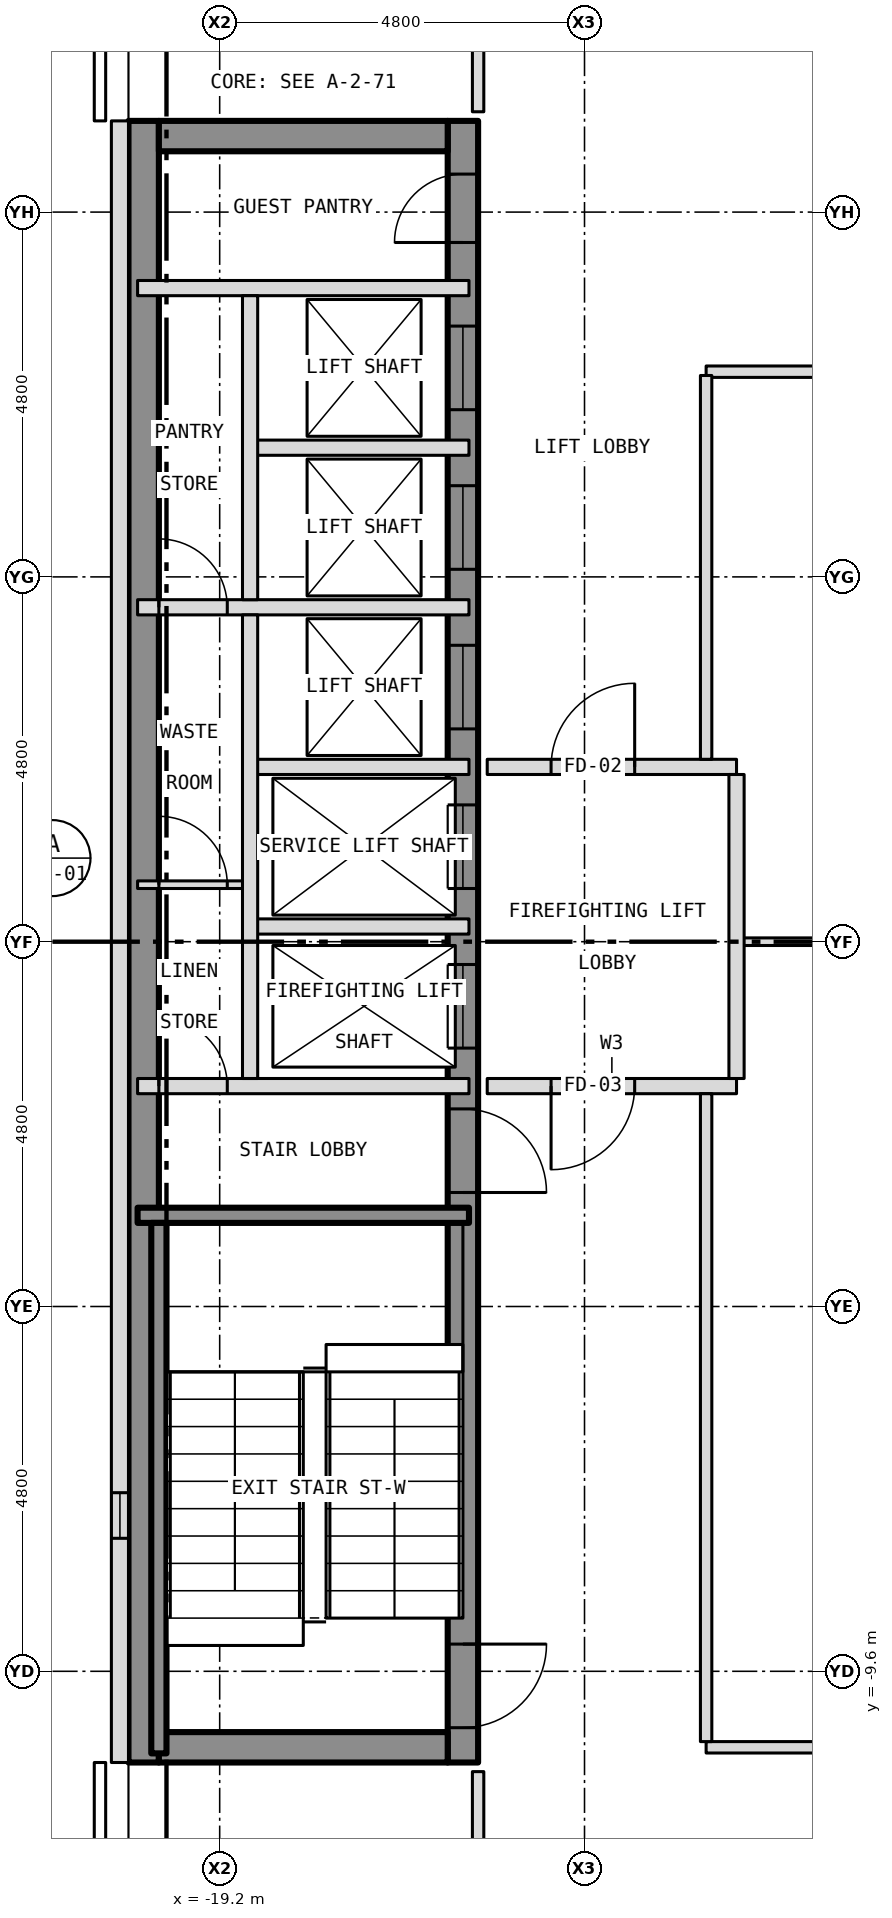
"""IFC4 building model, lengths in metres.
Left out: names, types, materials, properties, quantities, classifications, styles, units other than length and angle.
Written with IfcOpenShell. Run it as: python <this file> out.ifc"""

import sys

from ifc_helpers import new_model, si_unit, direction, frame, frame_2d, origin, place, context, subcontext, project, spatial, rectangle, extrude, element, fill, save


model = new_model("IFC4")
c1 = context("Model", 3, precision=1e-05, world=origin(), true_north=direction((0.0, 1.0)))
c2 = subcontext(c1, "Body", "Model", "MODEL_VIEW")
j1 = project(units=[si_unit("LENGTHUNIT", "METRE"), si_unit("PLANEANGLEUNIT", "RADIAN")], contexts=[c1])
p1 = place(None, origin())
s1 = spatial("IfcSite", under=j1, at=p1, CompositionType="ELEMENT")
p2 = place(p1, origin())
s2 = spatial("IfcBuilding", under=s1, at=p2, CompositionType="ELEMENT")
p3 = place(p2, frame((0.0, 0.0, 258.5)))
s3 = spatial("IfcBuildingStorey", under=s2, at=p3, CompositionType="ELEMENT", Elevation=258.5)
p4 = place(p3, frame((-16.0, -10.8, 0.0), z_axis=(0.0, 0.0, 1.0), x_axis=(0.0, 1.0, 0.0)))
e1 = element("IfcWall", 1, at=p4, inside=s3, PredefinedType="SHEAR", context=c2, shape_type="SweptSolid", body=[
    extrude(rectangle(XDim=21.6, YDim=0.4, at=frame_2d((10.8, 0.0))), origin(), (0.0, 0.0, 1.0), 3.25),
])
p5 = place(p4, frame((9.4, 0.0, 0.0)))
e2 = element("IfcOpeningElement", 2, at=p5, cuts=e1, PredefinedType="OPENING", context=c2, shape_type="SweptSolid", body=[
    extrude(rectangle(XDim=1.1, YDim=2.1, at=frame_2d((0.55, 1.05))), frame((0.0, 0.212, 0.0), z_axis=(0.0, -1.0, 0.0), x_axis=(1.0, 0.0, 0.0)), (0.0, 0.0, 1.0), 0.424),
])
p6 = place(p4, frame((11.5, 0.0, 0.0)))
e3 = element("IfcOpeningElement", 3, at=p6, cuts=e1, PredefinedType="OPENING", context=c2, shape_type="SweptSolid", body=[
    extrude(rectangle(XDim=1.1, YDim=2.1, at=frame_2d((0.55, 1.05))), frame((0.0, 0.212, 0.0), z_axis=(0.0, -1.0, 0.0), x_axis=(1.0, 0.0, 0.0)), (0.0, 0.0, 1.0), 0.424),
])
p7 = place(p4, frame((13.6, 0.0, 0.0)))
e4 = element("IfcOpeningElement", 4, at=p7, cuts=e1, PredefinedType="OPENING", context=c2, shape_type="SweptSolid", body=[
    extrude(rectangle(XDim=1.1, YDim=2.1, at=frame_2d((0.55, 1.05))), frame((0.0, 0.212, 0.0), z_axis=(0.0, -1.0, 0.0), x_axis=(1.0, 0.0, 0.0)), (0.0, 0.0, 1.0), 0.424),
])
p8 = place(p4, frame((15.7, 0.0, 0.0)))
e5 = element("IfcOpeningElement", 5, at=p8, cuts=e1, PredefinedType="OPENING", context=c2, shape_type="SweptSolid", body=[
    extrude(rectangle(XDim=1.1, YDim=2.1, at=frame_2d((0.55, 1.05))), frame((0.0, 0.212, 0.0), z_axis=(0.0, -1.0, 0.0), x_axis=(1.0, 0.0, 0.0)), (0.0, 0.0, 1.0), 0.424),
])
p9 = place(p4, frame((17.8, 0.0, 0.0)))
e6 = element("IfcOpeningElement", 6, at=p9, cuts=e1, PredefinedType="OPENING", context=c2, shape_type="SweptSolid", body=[
    extrude(rectangle(XDim=1.1, YDim=2.1, at=frame_2d((0.55, 1.05))), frame((0.0, 0.212, 0.0), z_axis=(0.0, -1.0, 0.0), x_axis=(1.0, 0.0, 0.0)), (0.0, 0.0, 1.0), 0.424),
])
p10 = place(p4, frame((0.458, 0.0, 0.0)))
e7 = element("IfcOpeningElement", 7, at=p10, cuts=e1, PredefinedType="OPENING", context=c2, shape_type="SweptSolid", body=[
    extrude(rectangle(XDim=1.1, YDim=2.1, at=frame_2d((0.55, 1.05))), frame((0.0, 0.212, 0.0), z_axis=(0.0, -1.0, 0.0), x_axis=(1.0, 0.0, 0.0)), (0.0, 0.0, 1.0), 0.424),
])
p11 = place(p4, frame((7.5, 0.0, 0.0)))
e8 = element("IfcOpeningElement", 8, at=p11, cuts=e1, PredefinedType="OPENING", context=c2, shape_type="SweptSolid", body=[
    extrude(rectangle(XDim=1.1, YDim=2.1, at=frame_2d((0.55, 1.05))), frame((0.0, 0.212, 0.0), z_axis=(0.0, -1.0, 0.0), x_axis=(1.0, 0.0, 0.0)), (0.0, 0.0, 1.0), 0.424),
])
p12 = place(p4, frame((20.0, 0.0, 0.0)))
e9 = element("IfcOpeningElement", 9, at=p12, cuts=e1, PredefinedType="OPENING", context=c2, shape_type="SweptSolid", body=[
    extrude(rectangle(XDim=0.9, YDim=2.1, at=frame_2d((0.45, 1.05))), frame((0.0, 0.212, 0.0), z_axis=(0.0, -1.0, 0.0), x_axis=(1.0, 0.0, 0.0)), (0.0, 0.0, 1.0), 0.424),
])
p13 = place(p3, frame((-20.2, -10.8, 0.0), z_axis=(0.0, 0.0, 1.0), x_axis=(0.0, 1.0, 0.0)))
e10 = element("IfcWall", 10, at=p13, inside=s3, PredefinedType="SHEAR", context=c2, shape_type="SweptSolid", body=[
    extrude(rectangle(XDim=21.6, YDim=0.4, at=frame_2d((10.8, 0.0))), origin(), (0.0, 0.0, 1.0), 3.25),
])
for number, where, z_axis, x_axis in (
    (11, (-20.0, 10.6, 0.0), (0.0, 0.0, 1.0), (1.0, 0.0, 0.0)),
    (12, (-20.0, -10.6, 0.0), (0.0, 0.0, 1.0), (1.0, 0.0, 0.0)),
):
    element("IfcWall", number, at=place(p3, frame(where, z_axis=z_axis, x_axis=x_axis)), inside=s3, PredefinedType="SHEAR", context=c2, shape_type="SweptSolid", body=[
        extrude(rectangle(XDim=3.8, YDim=0.4, at=frame_2d((1.9, 0.0))), origin(), (0.0, 0.0, 1.0), 3.25),
    ])
p14 = place(p3, frame((-20.512, 10.8, 0.0), z_axis=(0.0, 0.0, 1.0), x_axis=(0.0, -1.0, 0.0)))
e13 = element("IfcWall", 13, at=p14, inside=s3, PredefinedType="SOLIDWALL", context=c2, shape_type="SweptSolid", body=[
    extrude(rectangle(XDim=21.6, YDim=0.225, at=frame_2d((10.8, 0.0))), origin(), (0.0, 0.0, 1.0), 3.5),
])
p15 = place(p14, frame((18.05, 0.0, 1.0)))
e14 = element("IfcOpeningElement", 14, at=p15, cuts=e13, PredefinedType="OPENING", context=c2, shape_type="SweptSolid", body=[
    extrude(rectangle(XDim=0.6, YDim=1.5, at=frame_2d((0.3, 0.75))), frame((0.0, 0.125, 0.0), z_axis=(0.0, -1.0, 0.0), x_axis=(1.0, 0.0, 0.0)), (0.0, 0.0, 1.0), 0.249),
])
p16 = place(p3, frame((-12.8, -10.6, 0.0), z_axis=(0.0, 0.0, 1.0), x_axis=(1.0, 0.0, 0.0)))
e15 = element("IfcWall", 15, at=p16, inside=s3, PredefinedType="PARTITIONING", context=c2, shape_type="SweptSolid", body=[
    extrude(rectangle(XDim=18.7, YDim=0.15, at=frame_2d((9.35, 0.0))), origin(), (0.0, 0.0, 1.0), 3.35),
])
p17 = place(p16, frame((8.9, 0.0, 0.0)))
e16 = element("IfcOpeningElement", 16, at=p17, cuts=e15, PredefinedType="OPENING", context=c2, shape_type="SweptSolid", body=[
    extrude(rectangle(XDim=0.9, YDim=2.1, at=frame_2d((0.45, 1.05))), frame((0.0, 0.087, 0.0), z_axis=(0.0, -1.0, 0.0), x_axis=(1.0, 0.0, 0.0)), (0.0, 0.0, 1.0), 0.174),
])
p18 = place(p3, frame((-20.28, -3.6, 0.0), z_axis=(0.0, 0.0, 1.0), x_axis=(1.0, 0.0, 0.0)))
e17 = element("IfcWall", 17, at=p18, inside=s3, PredefinedType="SHEAR", context=c2, shape_type="SweptSolid", body=[
    extrude(rectangle(XDim=4.36, YDim=0.2, at=frame_2d((2.18, 0.0))), origin(), (0.0, 0.0, 1.0), 3.25),
])
p19 = place(p3, frame((-20.28, -1.9, 0.0), z_axis=(0.0, 0.0, 1.0), x_axis=(1.0, 0.0, 0.0)))
e18 = element("IfcWall", 18, at=p19, inside=s3, PredefinedType="PARTITIONING", context=c2, shape_type="SweptSolid", body=[
    extrude(rectangle(XDim=4.36, YDim=0.2, at=frame_2d((2.18, 0.0))), origin(), (0.0, 0.0, 1.0), 3.25),
])
p20 = place(p19, frame((0.28, 0.0, 0.0)))
e19 = element("IfcOpeningElement", 19, at=p20, cuts=e18, PredefinedType="OPENING", context=c2, shape_type="SweptSolid", body=[
    extrude(rectangle(XDim=0.9, YDim=2.1, at=frame_2d((0.45, 1.05))), frame((0.0, 0.112, 0.0), z_axis=(0.0, -1.0, 0.0), x_axis=(1.0, 0.0, 0.0)), (0.0, 0.0, 1.0), 0.224),
])
p21 = place(p3, frame((-15.68, -1.9, 0.0), z_axis=(0.0, 0.0, 1.0), x_axis=(1.0, 0.0, 0.0)))
e20 = element("IfcWall", 20, at=p21, inside=s3, PredefinedType="PARTITIONING", context=c2, shape_type="SweptSolid", body=[
    extrude(rectangle(XDim=3.28, YDim=0.2, at=frame_2d((1.64, 0.0))), origin(), (0.0, 0.0, 1.0), 3.35),
])
p22 = place(p21, frame((0.84, 0.0, 0.0)))
e21 = element("IfcOpeningElement", 21, at=p22, cuts=e20, PredefinedType="OPENING", context=c2, shape_type="SweptSolid", body=[
    extrude(rectangle(XDim=1.1, YDim=2.1, at=frame_2d((0.55, 1.05))), frame((0.0, 0.112, 0.0), z_axis=(0.0, -1.0, 0.0), x_axis=(1.0, 0.0, 0.0)), (0.0, 0.0, 1.0), 0.224),
])
p23 = place(p3, frame((-12.4, 0.0, 0.0), z_axis=(0.0, 0.0, 1.0), x_axis=(1.0, 0.0, 0.0)))
e22 = element("IfcWall", 22, at=p23, inside=s3, PredefinedType="PARTITIONING", context=c2, shape_type="SweptSolid", body=[
    extrude(rectangle(XDim=2.616, YDim=0.1, at=frame_2d((1.308, 0.0))), origin(), (0.0, 0.0, 1.0), 2.728),
])
p24 = place(p3, frame((-18.8, 0.2, 0.0), z_axis=(0.0, 0.0, 1.0), x_axis=(1.0, 0.0, 0.0)))
e23 = element("IfcWall", 23, at=p24, inside=s3, PredefinedType="PARTITIONING", context=c2, shape_type="SweptSolid", body=[
    extrude(rectangle(XDim=2.88, YDim=0.2, at=frame_2d((1.44, 0.0))), origin(), (0.0, 0.0, 1.0), 3.25),
])
p25 = place(p3, frame((-20.28, 0.75, 0.0), z_axis=(0.0, 0.0, 1.0), x_axis=(1.0, 0.0, 0.0)))
e24 = element("IfcWall", 24, at=p25, inside=s3, PredefinedType="PARTITIONING", context=c2, shape_type="SweptSolid", body=[
    extrude(rectangle(XDim=1.48, YDim=0.1, at=frame_2d((0.74, 0.0))), origin(), (0.0, 0.0, 1.0), 3.25),
])
p26 = place(p25, frame((0.28, 0.0, 0.0)))
e25 = element("IfcOpeningElement", 25, at=p26, cuts=e24, PredefinedType="OPENING", context=c2, shape_type="SweptSolid", body=[
    extrude(rectangle(XDim=0.9, YDim=2.1, at=frame_2d((0.45, 1.05))), frame((0.0, 0.062, 0.0), z_axis=(0.0, -1.0, 0.0), x_axis=(1.0, 0.0, 0.0)), (0.0, 0.0, 1.0), 0.124),
])
p27 = place(p3, frame((-18.8, 2.3, 0.0), z_axis=(0.0, 0.0, 1.0), x_axis=(1.0, 0.0, 0.0)))
e26 = element("IfcWall", 26, at=p27, inside=s3, PredefinedType="PARTITIONING", context=c2, shape_type="SweptSolid", body=[
    extrude(rectangle(XDim=2.88, YDim=0.2, at=frame_2d((1.44, 0.0))), origin(), (0.0, 0.0, 1.0), 3.25),
])
p28 = place(p3, frame((-15.68, 2.3, 0.0), z_axis=(0.0, 0.0, 1.0), x_axis=(1.0, 0.0, 0.0)))
e27 = element("IfcWall", 27, at=p28, inside=s3, PredefinedType="PARTITIONING", context=c2, shape_type="SweptSolid", body=[
    extrude(rectangle(XDim=3.28, YDim=0.2, at=frame_2d((1.64, 0.0))), origin(), (0.0, 0.0, 1.0), 3.35),
])
p29 = place(p28, frame((0.84, 0.0, 0.0)))
e28 = element("IfcOpeningElement", 28, at=p29, cuts=e27, PredefinedType="OPENING", context=c2, shape_type="SweptSolid", body=[
    extrude(rectangle(XDim=1.1, YDim=2.1, at=frame_2d((0.55, 1.05))), frame((0.0, 0.112, 0.0), z_axis=(0.0, -1.0, 0.0), x_axis=(1.0, 0.0, 0.0)), (0.0, 0.0, 1.0), 0.224),
])
p30 = place(p3, frame((-20.28, 4.4, 0.0), z_axis=(0.0, 0.0, 1.0), x_axis=(1.0, 0.0, 0.0)))
e29 = element("IfcWall", 29, at=p30, inside=s3, PredefinedType="PARTITIONING", context=c2, shape_type="SweptSolid", body=[
    extrude(rectangle(XDim=4.36, YDim=0.2, at=frame_2d((2.18, 0.0))), origin(), (0.0, 0.0, 1.0), 3.25),
])
p31 = place(p30, frame((0.28, 0.0, 0.0)))
e30 = element("IfcOpeningElement", 30, at=p31, cuts=e29, PredefinedType="OPENING", context=c2, shape_type="SweptSolid", body=[
    extrude(rectangle(XDim=0.9, YDim=2.1, at=frame_2d((0.45, 1.05))), frame((0.0, 0.112, 0.0), z_axis=(0.0, -1.0, 0.0), x_axis=(1.0, 0.0, 0.0)), (0.0, 0.0, 1.0), 0.224),
])
p32 = place(p3, frame((-18.8, 6.5, 0.0), z_axis=(0.0, 0.0, 1.0), x_axis=(1.0, 0.0, 0.0)))
e31 = element("IfcWall", 31, at=p32, inside=s3, PredefinedType="PARTITIONING", context=c2, shape_type="SweptSolid", body=[
    extrude(rectangle(XDim=2.88, YDim=0.2, at=frame_2d((1.44, 0.0))), origin(), (0.0, 0.0, 1.0), 3.25),
])
p33 = place(p3, frame((-12.8, 7.5, 0.0), z_axis=(0.0, 0.0, 1.0), x_axis=(1.0, 0.0, 0.0)))
e32 = element("IfcWall", 32, at=p33, inside=s3, PredefinedType="PARTITIONING", context=c2, shape_type="SweptSolid", body=[
    extrude(rectangle(XDim=18.7, YDim=0.15, at=frame_2d((9.35, 0.0))), origin(), (0.0, 0.0, 1.0), 3.35),
])
p34 = place(p33, frame((8.9, 0.0, 0.0)))
e33 = element("IfcOpeningElement", 33, at=p34, cuts=e32, PredefinedType="OPENING", context=c2, shape_type="SweptSolid", body=[
    extrude(rectangle(XDim=0.9, YDim=2.1, at=frame_2d((0.45, 1.05))), frame((0.0, 0.087, 0.0), z_axis=(0.0, -1.0, 0.0), x_axis=(1.0, 0.0, 0.0)), (0.0, 0.0, 1.0), 0.174),
])
p35 = place(p3, frame((-20.28, 8.6, 0.0), z_axis=(0.0, 0.0, 1.0), x_axis=(1.0, 0.0, 0.0)))
e34 = element("IfcWall", 34, at=p35, inside=s3, PredefinedType="PARTITIONING", context=c2, shape_type="SweptSolid", body=[
    extrude(rectangle(XDim=4.36, YDim=0.2, at=frame_2d((2.18, 0.0))), origin(), (0.0, 0.0, 1.0), 3.25),
])
p36 = place(p3, frame((-20.0, -10.68, 0.0), z_axis=(0.0, 0.0, 1.0), x_axis=(0.0, 1.0, 0.0)))
e35 = element("IfcWall", 35, at=p36, inside=s3, PredefinedType="SHEAR", context=c2, shape_type="SweptSolid", body=[
    extrude(rectangle(XDim=6.98, YDim=0.2, at=frame_2d((3.49, 0.0))), origin(), (0.0, 0.0, 1.0), 3.25),
])
p37 = place(p3, frame((-18.8, -1.8, 0.0), z_axis=(0.0, 0.0, 1.0), x_axis=(0.0, 1.0, 0.0)))
e36 = element("IfcWall", 36, at=p37, inside=s3, PredefinedType="PARTITIONING", context=c2, shape_type="SweptSolid", body=[
    extrude(rectangle(XDim=6.1, YDim=0.2, at=frame_2d((3.05, 0.0))), origin(), (0.0, 0.0, 1.0), 3.25),
])
p38 = place(p3, frame((-18.8, 4.5, 0.0), z_axis=(0.0, 0.0, 1.0), x_axis=(0.0, 1.0, 0.0)))
e37 = element("IfcWall", 37, at=p38, inside=s3, PredefinedType="PARTITIONING", context=c2, shape_type="SweptSolid", body=[
    extrude(rectangle(XDim=4.0, YDim=0.2, at=frame_2d((2.0, 0.0))), origin(), (0.0, 0.0, 1.0), 3.25),
])
for number, where, z_axis, x_axis in (
    (38, (-15.8, -12.725, 0.0), (0.0, 0.0, 1.0), (0.0, 1.0, 0.0)),
    (39, (-15.8, 10.92, 0.0), (0.0, 0.0, 1.0), (0.0, 1.0, 0.0)),
):
    element("IfcWall", number, at=place(p3, frame(where, z_axis=z_axis, x_axis=x_axis)), inside=s3, PredefinedType="PARTITIONING", context=c2, shape_type="SweptSolid", body=[
        extrude(rectangle(XDim=1.805, YDim=0.15, at=frame_2d((0.903, 0.0))), origin(), (0.0, 0.0, 1.0), 3.35),
    ])
p39 = place(p3, frame((-12.8, -10.525, 0.0), z_axis=(0.0, 0.0, 1.0), x_axis=(0.0, 1.0, 0.0)))
e40 = element("IfcWall", 40, at=p39, inside=s3, PredefinedType="PARTITIONING", context=c2, shape_type="SweptSolid", body=[
    extrude(rectangle(XDim=8.525, YDim=0.15, at=frame_2d((4.262, 0.0))), origin(), (0.0, 0.0, 1.0), 3.35),
])
p40 = place(p3, frame((-12.8, 2.4, 0.0), z_axis=(0.0, 0.0, 1.0), x_axis=(0.0, 1.0, 0.0)))
e41 = element("IfcWall", 41, at=p40, inside=s3, PredefinedType="PARTITIONING", context=c2, shape_type="SweptSolid", body=[
    extrude(rectangle(XDim=5.05, YDim=0.15, at=frame_2d((2.525, 0.0))), origin(), (0.0, 0.0, 1.0), 3.35),
])
p41 = place(p3, frame((-12.4, -1.8, 0.0), z_axis=(0.0, 0.0, 1.0), x_axis=(0.0, 1.0, 0.0)))
e42 = element("IfcWall", 42, at=p41, inside=s3, PredefinedType="PARTITIONING", context=c2, shape_type="SweptSolid", body=[
    extrude(rectangle(XDim=4.0, YDim=0.2, at=frame_2d((2.0, 0.0))), origin(), (0.0, 0.0, 1.0), 3.35),
])
p42 = place(p15, origin())
e43 = element("IfcWindow", 43, at=p42, inside=s3, PartitioningType="SINGLE_PANEL", PredefinedType="WINDOW", context=c2, shape_type="SweptSolid", body=[
    extrude(rectangle(XDim=0.6, YDim=1.5, at=frame_2d((0.3, 0.75))), frame((0.0, -0.022, 0.0), z_axis=(0.0, -1.0, 0.0), x_axis=(1.0, 0.0, 0.0)), (0.0, 0.0, 1.0), 0.06),
])
fill(e14, e43)
p43 = place(p5, origin())
e44 = element("IfcDoor", 44, at=p43, inside=s3, OperationType="SLIDING_TO_LEFT", PredefinedType="DOOR", context=c2, shape_type="SweptSolid", body=[
    extrude(rectangle(XDim=1.1, YDim=2.1, at=frame_2d((0.55, 1.05))), frame((0.0, 0.025, 0.0), z_axis=(0.0, -1.0, 0.0), x_axis=(1.0, 0.0, 0.0)), (0.0, 0.0, 1.0), 0.05),
])
fill(e2, e44)
p44 = place(p6, origin())
e45 = element("IfcDoor", 45, at=p44, inside=s3, OperationType="SLIDING_TO_LEFT", PredefinedType="DOOR", context=c2, shape_type="SweptSolid", body=[
    extrude(rectangle(XDim=1.1, YDim=2.1, at=frame_2d((0.55, 1.05))), frame((0.0, 0.025, 0.0), z_axis=(0.0, -1.0, 0.0), x_axis=(1.0, 0.0, 0.0)), (0.0, 0.0, 1.0), 0.05),
])
fill(e3, e45)
p45 = place(p7, origin())
e46 = element("IfcDoor", 46, at=p45, inside=s3, OperationType="SLIDING_TO_LEFT", PredefinedType="DOOR", context=c2, shape_type="SweptSolid", body=[
    extrude(rectangle(XDim=1.1, YDim=2.1, at=frame_2d((0.55, 1.05))), frame((0.0, 0.025, 0.0), z_axis=(0.0, -1.0, 0.0), x_axis=(1.0, 0.0, 0.0)), (0.0, 0.0, 1.0), 0.05),
])
fill(e4, e46)
p46 = place(p8, origin())
e47 = element("IfcDoor", 47, at=p46, inside=s3, OperationType="SLIDING_TO_LEFT", PredefinedType="DOOR", context=c2, shape_type="SweptSolid", body=[
    extrude(rectangle(XDim=1.1, YDim=2.1, at=frame_2d((0.55, 1.05))), frame((0.0, 0.025, 0.0), z_axis=(0.0, -1.0, 0.0), x_axis=(1.0, 0.0, 0.0)), (0.0, 0.0, 1.0), 0.05),
])
fill(e5, e47)
p47 = place(p9, origin())
e48 = element("IfcDoor", 48, at=p47, inside=s3, OperationType="SLIDING_TO_LEFT", PredefinedType="DOOR", context=c2, shape_type="SweptSolid", body=[
    extrude(rectangle(XDim=1.1, YDim=2.1, at=frame_2d((0.55, 1.05))), frame((0.0, 0.025, 0.0), z_axis=(0.0, -1.0, 0.0), x_axis=(1.0, 0.0, 0.0)), (0.0, 0.0, 1.0), 0.05),
])
fill(e6, e48)
p48 = place(p10, origin())
e49 = element("IfcDoor", 49, at=p48, inside=s3, OperationType="SINGLE_SWING_RIGHT", PredefinedType="DOOR", context=c2, shape_type="SweptSolid", body=[
    extrude(rectangle(XDim=1.1, YDim=2.1, at=frame_2d((0.55, 1.05))), frame((0.0, 0.025, 0.0), z_axis=(0.0, -1.0, 0.0), x_axis=(1.0, 0.0, 0.0)), (0.0, 0.0, 1.0), 0.05),
])
fill(e7, e49)
p49 = place(p11, origin())
e50 = element("IfcDoor", 50, at=p49, inside=s3, OperationType="SINGLE_SWING_LEFT", PredefinedType="DOOR", context=c2, shape_type="SweptSolid", body=[
    extrude(rectangle(XDim=1.1, YDim=2.1, at=frame_2d((0.55, 1.05))), frame((0.0, 0.025, 0.0), z_axis=(0.0, -1.0, 0.0), x_axis=(1.0, 0.0, 0.0)), (0.0, 0.0, 1.0), 0.05),
])
fill(e8, e50)
p50 = place(p12, origin())
e51 = element("IfcDoor", 51, at=p50, inside=s3, OperationType="SINGLE_SWING_LEFT", PredefinedType="DOOR", context=c2, shape_type="SweptSolid", body=[
    extrude(rectangle(XDim=0.9, YDim=2.1, at=frame_2d((0.45, 1.05))), frame((0.0, 0.025, 0.0), z_axis=(0.0, -1.0, 0.0), x_axis=(1.0, 0.0, 0.0)), (0.0, 0.0, 1.0), 0.05),
])
fill(e9, e51)
p51 = place(p20, origin())
e52 = element("IfcDoor", 52, at=p51, inside=s3, OperationType="SINGLE_SWING_LEFT", PredefinedType="DOOR", context=c2, shape_type="SweptSolid", body=[
    extrude(rectangle(XDim=0.9, YDim=2.1, at=frame_2d((0.45, 1.05))), frame((0.0, 0.025, 0.0), z_axis=(0.0, -1.0, 0.0), x_axis=(1.0, 0.0, 0.0)), (0.0, 0.0, 1.0), 0.05),
])
fill(e19, e52)
p52 = place(p26, origin())
e53 = element("IfcDoor", 53, at=p52, inside=s3, OperationType="SINGLE_SWING_LEFT", PredefinedType="DOOR", context=c2, shape_type="SweptSolid", body=[
    extrude(rectangle(XDim=0.9, YDim=2.1, at=frame_2d((0.45, 1.05))), frame((0.0, 0.025, 0.0), z_axis=(0.0, -1.0, 0.0), x_axis=(1.0, 0.0, 0.0)), (0.0, 0.0, 1.0), 0.05),
])
fill(e25, e53)
p53 = place(p31, origin())
e54 = element("IfcDoor", 54, at=p53, inside=s3, OperationType="SINGLE_SWING_LEFT", PredefinedType="DOOR", context=c2, shape_type="SweptSolid", body=[
    extrude(rectangle(XDim=0.9, YDim=2.1, at=frame_2d((0.45, 1.05))), frame((0.0, 0.025, 0.0), z_axis=(0.0, -1.0, 0.0), x_axis=(1.0, 0.0, 0.0)), (0.0, 0.0, 1.0), 0.05),
])
fill(e30, e54)
p54 = place(p29, origin())
e55 = element("IfcDoor", 55, at=p54, inside=s3, OperationType="SINGLE_SWING_RIGHT", PredefinedType="DOOR", context=c2, shape_type="SweptSolid", body=[
    extrude(rectangle(XDim=1.1, YDim=2.1, at=frame_2d((0.55, 1.05))), frame((0.0, 0.025, 0.0), z_axis=(0.0, -1.0, 0.0), x_axis=(1.0, 0.0, 0.0)), (0.0, 0.0, 1.0), 0.05),
])
fill(e28, e55)
p55 = place(p22, origin())
e56 = element("IfcDoor", 56, at=p55, inside=s3, OperationType="SINGLE_SWING_LEFT", PredefinedType="DOOR", context=c2, shape_type="SweptSolid", body=[
    extrude(rectangle(XDim=1.1, YDim=2.1, at=frame_2d((0.55, 1.05))), frame((0.0, 0.025, 0.0), z_axis=(0.0, -1.0, 0.0), x_axis=(1.0, 0.0, 0.0)), (0.0, 0.0, 1.0), 0.05),
])
fill(e21, e56)
save(model, sys.argv[1])
